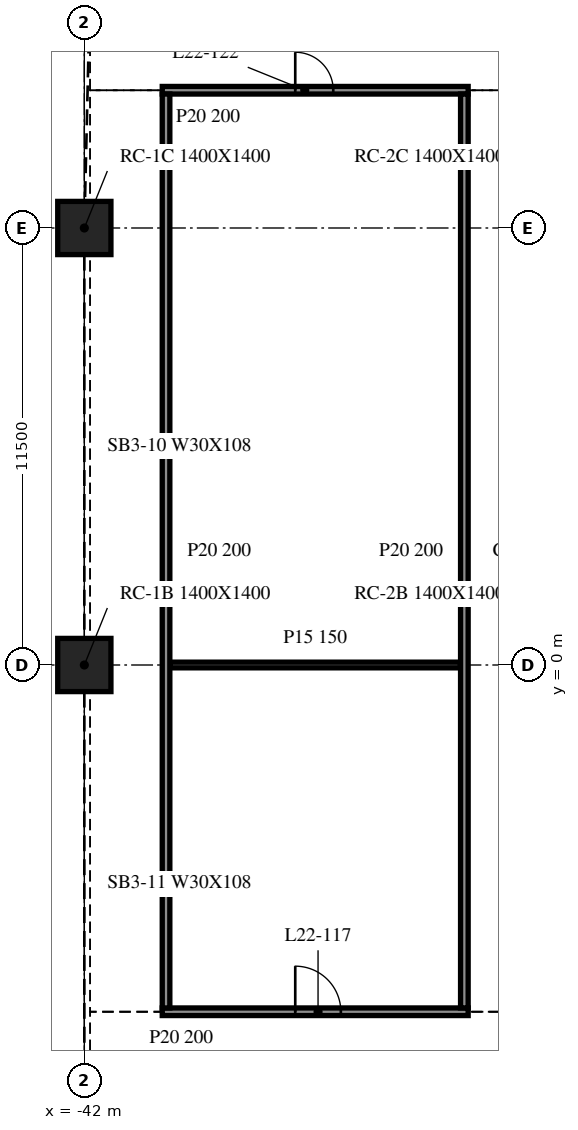
"""IFC4 building model, lengths in metres.
Left out: names, types, materials, properties, quantities, classifications, styles, units other than length and angle.
Written with IfcOpenShell. Run it as: python <this file> out.ifc"""

import sys

from ifc_helpers import new_model, si_unit, direction, frame, frame_2d, origin, origin_2d, place, context, subcontext, project, spatial, rectangle, extrude, element, fill, save


model = new_model("IFC4")
c1 = context("Model", 3, precision=1e-05, world=origin(), true_north=direction((0.0, 1.0)))
c2 = subcontext(c1, "Body", "Model", "MODEL_VIEW")
j1 = project(units=[si_unit("LENGTHUNIT", "METRE"), si_unit("PLANEANGLEUNIT", "RADIAN")], contexts=[c1])
p1 = place(None, origin())
s1 = spatial("IfcSite", under=j1, at=p1, CompositionType="ELEMENT")
p2 = place(p1, origin())
s2 = spatial("IfcBuilding", under=s1, at=p2, CompositionType="ELEMENT")
p3 = place(p2, frame((0.0, 0.0, 97.1)))
s3 = spatial("IfcBuildingStorey", under=s2, at=p3, CompositionType="ELEMENT", Elevation=97.1)
for number, where, z_axis, x_axis in (
    (1, (-42.0, 0.0, -0.34), (0.0, 0.0, 1.0), (1.0, 0.0, 0.0)),
    (2, (-42.0, 11.5, -0.34), (0.0, 0.0, 1.0), (1.0, 0.0, 0.0)),
):
    element("IfcColumn", number, at=place(p3, frame(where, z_axis=z_axis, x_axis=x_axis)), inside=s3, PredefinedType="COLUMN", context=c2, shape_type="SweptSolid", body=[
        extrude(rectangle(XDim=1.4, YDim=1.4, at=origin_2d()), origin(), (0.0, 0.0, 1.0), 4.1),
    ])
p4 = place(p3, frame((-39.95, -9.125, 0.0), z_axis=(0.0, 0.0, 1.0), x_axis=(1.0, 0.0, 0.0)))
e3 = element("IfcWall", 3, at=p4, inside=s3, PredefinedType="PARTITIONING", context=c2, shape_type="SweptSolid", body=[
    extrude(rectangle(XDim=8.05, YDim=0.2, at=frame_2d((4.025, 0.0))), origin(), (0.0, 0.0, 1.0), 3.76),
])
p5 = place(p4, frame((3.5, 0.0, 0.0)))
e4 = element("IfcOpeningElement", 4, at=p5, cuts=e3, PredefinedType="OPENING", context=c2, shape_type="SweptSolid", body=[
    extrude(rectangle(XDim=1.2, YDim=2.1, at=frame_2d((0.6, 1.05))), frame((0.0, 0.11, 0.0), z_axis=(0.0, -1.0, 0.0), x_axis=(1.0, 0.0, 0.0)), (0.0, 0.0, 1.0), 0.22),
])
p6 = place(p3, frame((-39.75, 0.0, 0.0), z_axis=(0.0, 0.0, 1.0), x_axis=(1.0, 0.0, 0.0)))
e5 = element("IfcWall", 5, at=p6, inside=s3, PredefinedType="PARTITIONING", context=c2, shape_type="SweptSolid", body=[
    extrude(rectangle(XDim=7.65, YDim=0.15, at=frame_2d((3.825, 0.0))), origin(), (0.0, 0.0, 1.0), 3.76),
])
p7 = place(p3, frame((-39.95, 15.125, 0.0), z_axis=(0.0, 0.0, 1.0), x_axis=(1.0, 0.0, 0.0)))
e6 = element("IfcWall", 6, at=p7, inside=s3, PredefinedType="PARTITIONING", context=c2, shape_type="SweptSolid", body=[
    extrude(rectangle(XDim=8.05, YDim=0.2, at=frame_2d((4.025, 0.0))), origin(), (0.0, 0.0, 1.0), 3.76),
])
p8 = place(p7, frame((3.5, 0.0, 0.0)))
e7 = element("IfcOpeningElement", 7, at=p8, cuts=e6, PredefinedType="OPENING", context=c2, shape_type="SweptSolid", body=[
    extrude(rectangle(XDim=1.0, YDim=2.1, at=frame_2d((0.5, 1.05))), frame((0.0, 0.11, 0.0), z_axis=(0.0, -1.0, 0.0), x_axis=(1.0, 0.0, 0.0)), (0.0, 0.0, 1.0), 0.22),
])
for number, where, z_axis, x_axis in (
    (8, (-39.85, -9.025, 0.0), (0.0, 0.0, 1.0), (0.0, 1.0, 0.0)),
    (9, (-32.0, -9.025, 0.0), (0.0, 0.0, 1.0), (0.0, 1.0, 0.0)),
):
    element("IfcWall", number, at=place(p3, frame(where, z_axis=z_axis, x_axis=x_axis)), inside=s3, PredefinedType="PARTITIONING", context=c2, shape_type="SweptSolid", body=[
        extrude(rectangle(XDim=24.05, YDim=0.2, at=frame_2d((12.025, 0.0))), origin(), (0.0, 0.0, 1.0), 3.76),
    ])
p9 = place(p5, origin())
e10 = element("IfcDoor", 10, at=p9, inside=s3, OperationType="SINGLE_SWING_RIGHT", PredefinedType="DOOR", context=c2, shape_type="SweptSolid", body=[
    extrude(rectangle(XDim=1.2, YDim=2.1, at=frame_2d((0.6, 1.05))), frame((0.0, 0.025, 0.0), z_axis=(0.0, -1.0, 0.0), x_axis=(1.0, 0.0, 0.0)), (0.0, 0.0, 1.0), 0.05),
])
fill(e4, e10)
p10 = place(p8, origin())
e11 = element("IfcDoor", 11, at=p10, inside=s3, OperationType="SINGLE_SWING_RIGHT", PredefinedType="DOOR", context=c2, shape_type="SweptSolid", body=[
    extrude(rectangle(XDim=1.0, YDim=2.1, at=frame_2d((0.5, 1.05))), frame((0.0, 0.025, 0.0), z_axis=(0.0, -1.0, 0.0), x_axis=(1.0, 0.0, 0.0)), (0.0, 0.0, 1.0), 0.05),
])
fill(e7, e11)
save(model, sys.argv[1])
